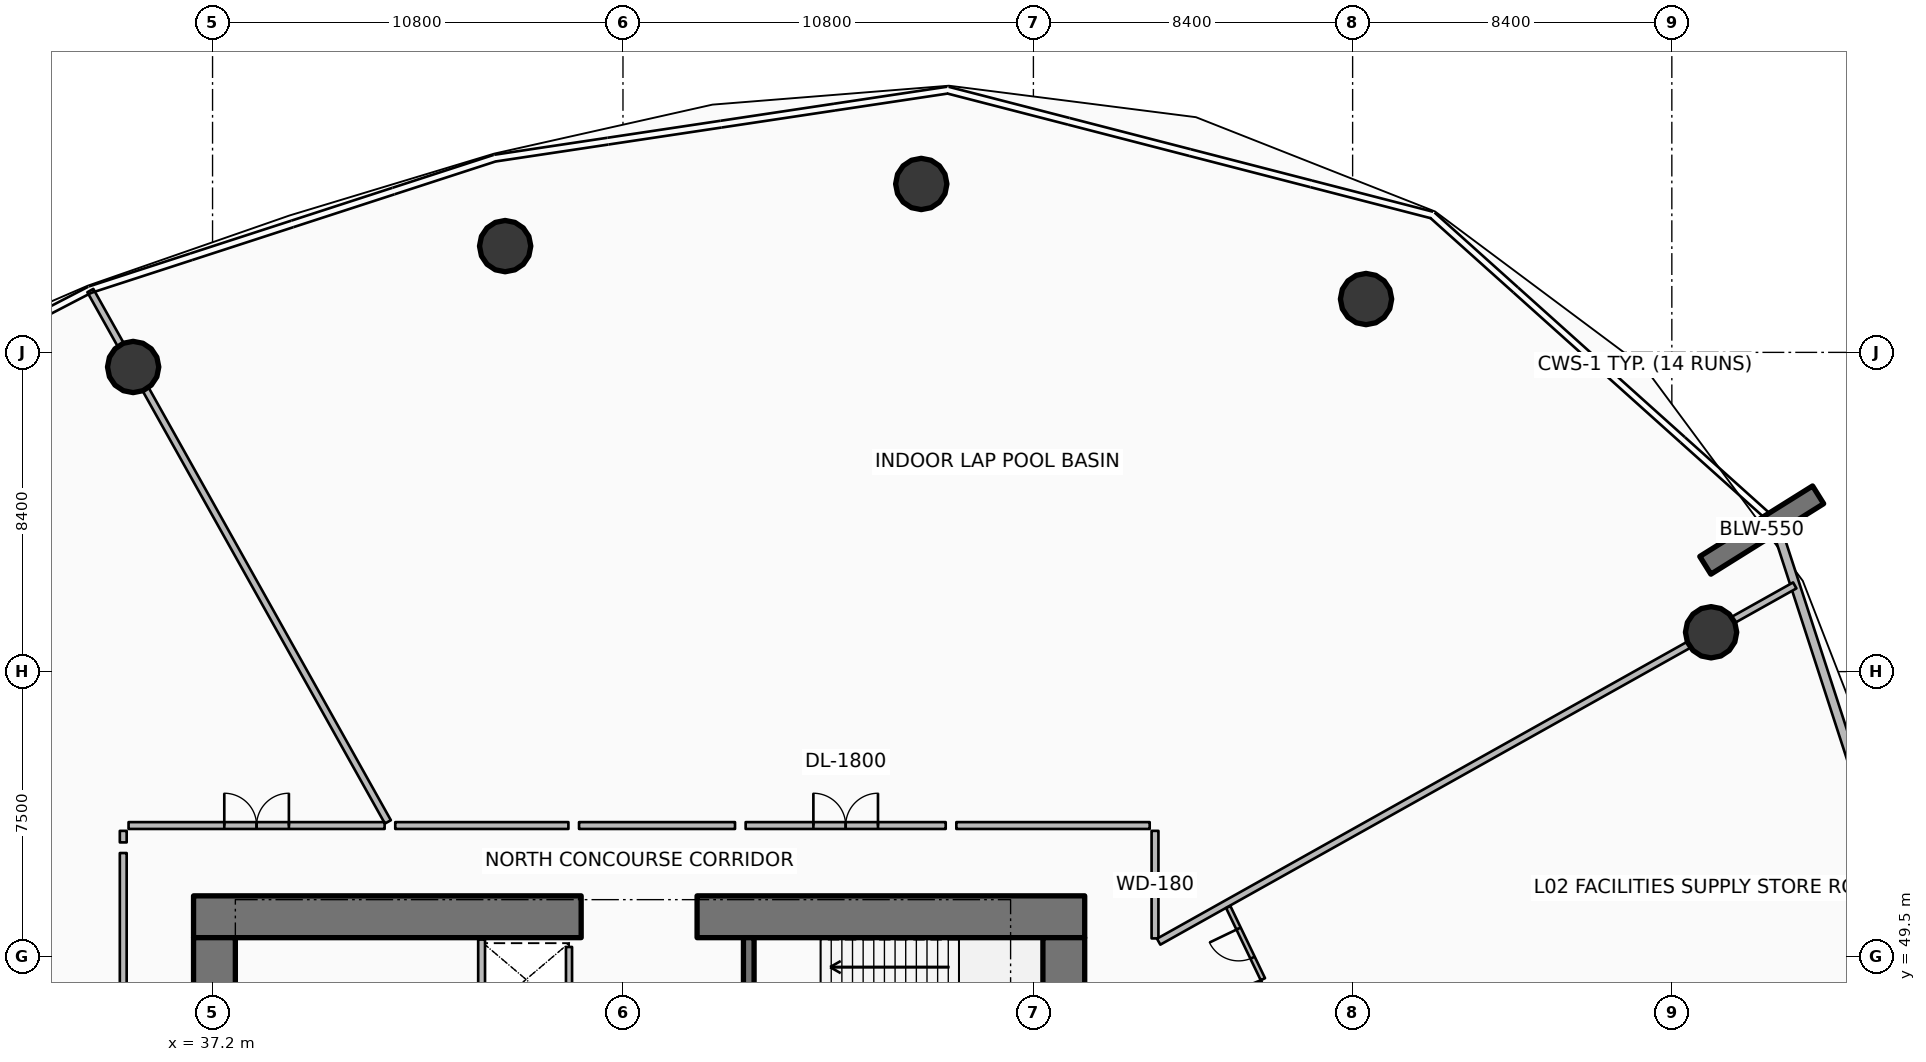
"""IFC4 building model, lengths in metres.
Left out: names, types, materials, properties, quantities, classifications, styles, units other than length and angle.
Written with IfcOpenShell. Run it as: python <this file> out.ifc"""

import sys

from ifc_helpers import new_model, si_unit, direction, frame, frame_2d, origin, origin_2d, place, context, subcontext, project, spatial, rectangle, circle, extrude, element, fill, save


model = new_model("IFC4")
c1 = context("Model", 3, precision=1e-05, world=origin(), true_north=direction((0.0, 1.0)))
c2 = subcontext(c1, "Body", "Model", "MODEL_VIEW")
j1 = project(units=[si_unit("LENGTHUNIT", "METRE"), si_unit("PLANEANGLEUNIT", "RADIAN")], contexts=[c1])
p1 = place(None, origin())
s1 = spatial("IfcSite", under=j1, at=p1, CompositionType="ELEMENT")
p2 = place(p1, origin())
s2 = spatial("IfcBuilding", under=s1, at=p2, CompositionType="ELEMENT")
p3 = place(p2, frame((0.0, 0.0, 12.0)))
s3 = spatial("IfcBuildingStorey", under=s2, at=p3, CompositionType="ELEMENT", Elevation=12.0)
for number, where, z_axis, x_axis in (
    (1, (36.7, 50.55, 0.0), (0.0, 0.0, 1.0), (1.0, 0.0, 0.0)),
    (2, (49.95, 50.55, 0.0), (0.0, 0.0, 1.0), (1.0, 0.0, 0.0)),
):
    element("IfcWall", number, at=place(p3, frame(where, z_axis=z_axis, x_axis=x_axis)), inside=s3, PredefinedType="SHEAR", context=c2, shape_type="SweptSolid", body=[
        extrude(rectangle(XDim=10.2, YDim=1.1, at=frame_2d((5.1, 0.0))), origin(), (0.0, 0.0, 1.0), 4.8),
    ])
for number, where, z_axis, x_axis in (
    (3, (37.25, 34.0, 0.0), (0.0, 0.0, 1.0), (0.0, 1.0, 0.0)),
    (4, (59.6, 34.0, 0.0), (0.0, 0.0, 1.0), (0.0, 1.0, 0.0)),
):
    element("IfcWall", number, at=place(p3, frame(where, z_axis=z_axis, x_axis=x_axis)), inside=s3, PredefinedType="SHEAR", context=c2, shape_type="SweptSolid", body=[
        extrude(rectangle(XDim=16.0, YDim=1.1, at=frame_2d((8.0, 0.0))), origin(), (0.0, 0.0, 1.0), 4.8),
    ])
p4 = place(p3, frame((51.31, 46.5, 0.0), z_axis=(0.0, 0.0, 1.0), x_axis=(0.0, 1.0, 0.0)))
e5 = element("IfcWall", 5, at=p4, inside=s3, PredefinedType="SHEAR", context=c2, shape_type="SweptSolid", body=[
    extrude(rectangle(XDim=3.5, YDim=0.28, at=frame_2d((1.75, 0.0))), origin(), (0.0, 0.0, 1.0), 4.8),
])
p5 = place(p3, frame((76.481, 59.797, 0.0), z_axis=(0.0, 0.0, 1.0), x_axis=(0.848053161125, 0.529911158502, 0.0)))
e6 = element("IfcWall", 6, at=p5, inside=s3, PredefinedType="SOLIDWALL", context=c2, shape_type="SweptSolid", body=[
    extrude(rectangle(XDim=3.5, YDim=0.55, at=frame_2d((1.75, 0.0))), origin(), (0.0, 0.0, 1.0), 4.8),
])
for number, where, z_axis, x_axis in (
    (7, (76.633, 58.035, 0.0), (0.0, 0.0, 1.0), (1.0, 0.0, 0.0)),
    (8, (67.553, 66.803, 0.0), (0.0, 0.0, 1.0), (1.0, 0.0, 0.0)),
    (9, (55.849, 69.831, 0.0), (0.0, 0.0, 1.0), (1.0, 0.0, 0.0)),
    (10, (44.899, 68.196, 0.0), (0.0, 0.0, 1.0), (1.0, 0.0, 0.0)),
    (11, (35.111, 65.016, 0.0), (0.0, 0.0, 1.0), (1.0, 0.0, 0.0)),
):
    element("IfcColumn", number, at=place(p3, frame(where, z_axis=z_axis, x_axis=x_axis)), inside=s3, PredefinedType="COLUMN", context=c2, shape_type="SweptSolid", body=[
        extrude(circle(Radius=0.675, at=origin_2d()), origin(), (0.0, 0.0, 1.0), 4.48),
    ])
p6 = place(p3, frame((83.573, 44.725, 0.0), z_axis=(0.0, 0.0, 1.0), x_axis=(-0.309022005354, 0.951054888115, 0.0)))
e12 = element("IfcWall", 12, at=p6, inside=s3, PredefinedType="SOLIDWALL", context=c2, shape_type="SweptSolid", body=[
    extrude(rectangle(XDim=16.803, YDim=0.24, at=frame_2d((8.401, 0.0))), origin(), (0.0, 0.0, 1.0), 3.43),
])
p7 = place(p6, frame((7.201, 0.0, 0.85)))
e13 = element("IfcOpeningElement", 13, at=p7, cuts=e12, PredefinedType="OPENING", context=c2, shape_type="SweptSolid", body=[
    extrude(rectangle(XDim=2.4, YDim=2.1, at=frame_2d((1.2, 1.05))), frame((0.0, 0.13, 0.0), z_axis=(0.0, -1.0, 0.0), x_axis=(1.0, 0.0, 0.0)), (0.0, 0.0, 1.0), 0.26),
])
p8 = place(p3, frame((46.58, 48.045, 0.0), z_axis=(0.0, 0.0, 1.0), x_axis=(0.0, 1.0, 0.0)))
e14 = element("IfcWall", 14, at=p8, inside=s3, PredefinedType="PARTITIONING", context=c2, shape_type="SweptSolid", body=[
    extrude(rectangle(XDim=1.71, YDim=0.16, at=frame_2d((0.855, 0.0))), origin(), (0.0, 0.0, 1.0), 4.48),
])
p9 = place(p3, frame((44.28, 47.82, 0.0), z_axis=(0.0, 0.0, 1.0), x_axis=(0.0, 1.0, 0.0)))
e15 = element("IfcWall", 15, at=p9, inside=s3, PredefinedType="PARTITIONING", context=c2, shape_type="SweptSolid", body=[
    extrude(rectangle(XDim=2.13, YDim=0.18, at=frame_2d((1.065, 0.0))), origin(), (0.0, 0.0, 1.0), 4.48),
])
p10 = place(p3, frame((62.0, 49.98, 0.0), z_axis=(0.0, 0.0, 1.0), x_axis=(0.0, 1.0, 0.0)))
e16 = element("IfcWall", 16, at=p10, inside=s3, PredefinedType="PARTITIONING", context=c2, shape_type="SweptSolid", body=[
    extrude(rectangle(XDim=2.83, YDim=0.18, at=frame_2d((1.415, 0.0))), origin(), (0.0, 0.0, 1.0), 3.693),
])
p11 = place(p3, frame((61.86, 52.95, 0.0), z_axis=(0.0, 0.0, 1.0), x_axis=(-1.0, 0.0, 0.0)))
e17 = element("IfcWall", 17, at=p11, inside=s3, PredefinedType="PARTITIONING", context=c2, shape_type="SweptSolid", body=[
    extrude(rectangle(XDim=5.088, YDim=0.18, at=frame_2d((2.544, 0.0))), origin(), (0.0, 0.0, 1.0), 3.693),
])
p12 = place(p3, frame((56.492, 52.95, 0.0), z_axis=(0.0, 0.0, 1.0), x_axis=(-1.0, 0.0, 0.0)))
e18 = element("IfcWall", 18, at=p12, inside=s3, PredefinedType="PARTITIONING", context=c2, shape_type="SweptSolid", body=[
    extrude(rectangle(XDim=5.264, YDim=0.18, at=frame_2d((2.632, 0.0))), origin(), (0.0, 0.0, 1.0), 3.693),
])
p13 = place(p12, frame((1.782, 0.0, 0.0)))
e19 = element("IfcOpeningElement", 19, at=p13, cuts=e18, PredefinedType="OPENING", context=c2, shape_type="SweptSolid", body=[
    extrude(rectangle(XDim=1.7, YDim=2.15, at=frame_2d((0.85, 1.075))), frame((0.0, 0.1, 0.0), z_axis=(0.0, -1.0, 0.0), x_axis=(1.0, 0.0, 0.0)), (0.0, 0.0, 1.0), 0.2),
])
p14 = place(p3, frame((50.948, 52.95, 0.0), z_axis=(0.0, 0.0, 1.0), x_axis=(-1.0, 0.0, 0.0)))
e20 = element("IfcWall", 20, at=p14, inside=s3, PredefinedType="PARTITIONING", context=c2, shape_type="SweptSolid", body=[
    extrude(rectangle(XDim=4.104, YDim=0.18, at=frame_2d((2.052, 0.0))), origin(), (0.0, 0.0, 1.0), 3.693),
])
p15 = place(p3, frame((46.564, 52.95, 0.0), z_axis=(0.0, 0.0, 1.0), x_axis=(-1.0, 0.0, 0.0)))
e21 = element("IfcWall", 21, at=p15, inside=s3, PredefinedType="PARTITIONING", context=c2, shape_type="SweptSolid", body=[
    extrude(rectangle(XDim=4.556, YDim=0.18, at=frame_2d((2.278, 0.0))), origin(), (0.0, 0.0, 1.0), 3.693),
])
p16 = place(p3, frame((62.096, 49.894, 0.0), z_axis=(0.0, 0.0, 1.0), x_axis=(0.872490608205, 0.488630881744, 0.0)))
e22 = element("IfcWall", 22, at=p16, inside=s3, PredefinedType="PARTITIONING", context=c2, shape_type="SweptSolid", body=[
    extrude(rectangle(XDim=19.185, YDim=0.18, at=frame_2d((9.592, 0.0))), origin(), (0.0, 0.0, 1.0), 3.693),
])
p17 = place(p3, frame((41.814, 53.046, 0.0), z_axis=(0.0, 0.0, 1.0), x_axis=(-0.48862053439, 0.872496403071, 0.0)))
e23 = element("IfcWall", 23, at=p17, inside=s3, PredefinedType="PARTITIONING", context=c2, shape_type="SweptSolid", body=[
    extrude(rectangle(XDim=16.024, YDim=0.18, at=frame_2d((8.012, 0.0))), origin(), (0.0, 0.0, 1.0), 3.693),
])
p18 = place(p3, frame((41.728, 52.95, 0.0), z_axis=(0.0, 0.0, 1.0), x_axis=(-1.0, 0.0, 0.0)))
e24 = element("IfcWall", 24, at=p18, inside=s3, PredefinedType="PARTITIONING", context=c2, shape_type="SweptSolid", body=[
    extrude(rectangle(XDim=6.738, YDim=0.18, at=frame_2d((3.369, 0.0))), origin(), (0.0, 0.0, 1.0), 3.693),
])
p19 = place(p18, frame((2.519, 0.0, 0.0)))
e25 = element("IfcOpeningElement", 25, at=p19, cuts=e24, PredefinedType="OPENING", context=c2, shape_type="SweptSolid", body=[
    extrude(rectangle(XDim=1.7, YDim=2.15, at=frame_2d((0.85, 1.075))), frame((0.0, 0.1, 0.0), z_axis=(0.0, -1.0, 0.0), x_axis=(1.0, 0.0, 0.0)), (0.0, 0.0, 1.0), 0.2),
])
p20 = place(p3, frame((34.85, 52.81, 0.0), z_axis=(0.0, 0.0, 1.0), x_axis=(0.0, -1.0, 0.0)))
e26 = element("IfcWall", 26, at=p20, inside=s3, PredefinedType="PARTITIONING", context=c2, shape_type="SweptSolid", body=[
    extrude(rectangle(XDim=0.303, YDim=0.18, at=frame_2d((0.152, 0.0))), origin(), (0.0, 0.0, 1.0), 3.693),
])
p21 = place(p3, frame((34.85, 52.227, 0.0), z_axis=(0.0, 0.0, 1.0), x_axis=(0.0, -1.0, 0.0)))
e27 = element("IfcWall", 27, at=p21, inside=s3, PredefinedType="PARTITIONING", context=c2, shape_type="SweptSolid", body=[
    extrude(rectangle(XDim=6.378, YDim=0.18, at=frame_2d((3.189, 0.0))), origin(), (0.0, 0.0, 1.0), 3.693),
])
p22 = place(p3, frame((62.074, 47.701, 0.0), z_axis=(0.0, 0.0, 1.0), x_axis=(0.926852538468, 0.375425587747, 0.0)))
e28 = element("IfcWall", 28, at=p22, inside=s3, PredefinedType="PARTITIONING", context=c2, shape_type="SweptSolid", body=[
    extrude(rectangle(XDim=2.96, YDim=0.15, at=frame_2d((1.48, 0.0))), origin(), (0.0, 0.0, 1.0), 3.92),
])
p23 = place(p3, frame((64.839, 48.906, 0.0), z_axis=(0.0, 0.0, 1.0), x_axis=(-0.432923235959, 0.901430791446, 0.0)))
e29 = element("IfcWall", 29, at=p23, inside=s3, PredefinedType="PARTITIONING", context=c2, shape_type="SweptSolid", body=[
    extrude(rectangle(XDim=2.106, YDim=0.125, at=frame_2d((1.053, 0.0))), origin(), (0.0, 0.0, 1.0), 3.693),
])
p24 = place(p23, frame((0.628, 0.0, 0.0)))
e30 = element("IfcOpeningElement", 30, at=p24, cuts=e29, PredefinedType="OPENING", context=c2, shape_type="SweptSolid", body=[
    extrude(rectangle(XDim=0.85, YDim=2.06, at=frame_2d((0.425, 1.03))), frame((0.0, 0.073, 0.0), z_axis=(0.0, -1.0, 0.0), x_axis=(1.0, 0.0, 0.0)), (0.0, 0.0, 1.0), 0.145),
])
p25 = place(p13, origin())
e31 = element("IfcDoor", 31, at=p25, inside=s3, OperationType="DOUBLE_DOOR_SINGLE_SWING", PredefinedType="DOOR", context=c2, shape_type="SweptSolid", body=[
    extrude(rectangle(XDim=1.7, YDim=2.15, at=frame_2d((0.85, 1.075))), frame((0.0, 0.025, 0.0), z_axis=(0.0, -1.0, 0.0), x_axis=(1.0, 0.0, 0.0)), (0.0, 0.0, 1.0), 0.05),
])
fill(e19, e31)
p26 = place(p19, origin())
e32 = element("IfcDoor", 32, at=p26, inside=s3, OperationType="DOUBLE_DOOR_SINGLE_SWING", PredefinedType="DOOR", context=c2, shape_type="SweptSolid", body=[
    extrude(rectangle(XDim=1.7, YDim=2.15, at=frame_2d((0.85, 1.075))), frame((0.0, 0.025, 0.0), z_axis=(0.0, -1.0, 0.0), x_axis=(1.0, 0.0, 0.0)), (0.0, 0.0, 1.0), 0.05),
])
fill(e25, e32)
p27 = place(p24, origin())
e33 = element("IfcDoor", 33, at=p27, inside=s3, OperationType="SINGLE_SWING_RIGHT", PredefinedType="DOOR", context=c2, shape_type="SweptSolid", body=[
    extrude(rectangle(XDim=0.85, YDim=2.06, at=frame_2d((0.425, 1.03))), frame((0.0, 0.025, 0.0), z_axis=(0.0, -1.0, 0.0), x_axis=(1.0, 0.0, 0.0)), (0.0, 0.0, 1.0), 0.05),
])
fill(e30, e33)
save(model, sys.argv[1])
